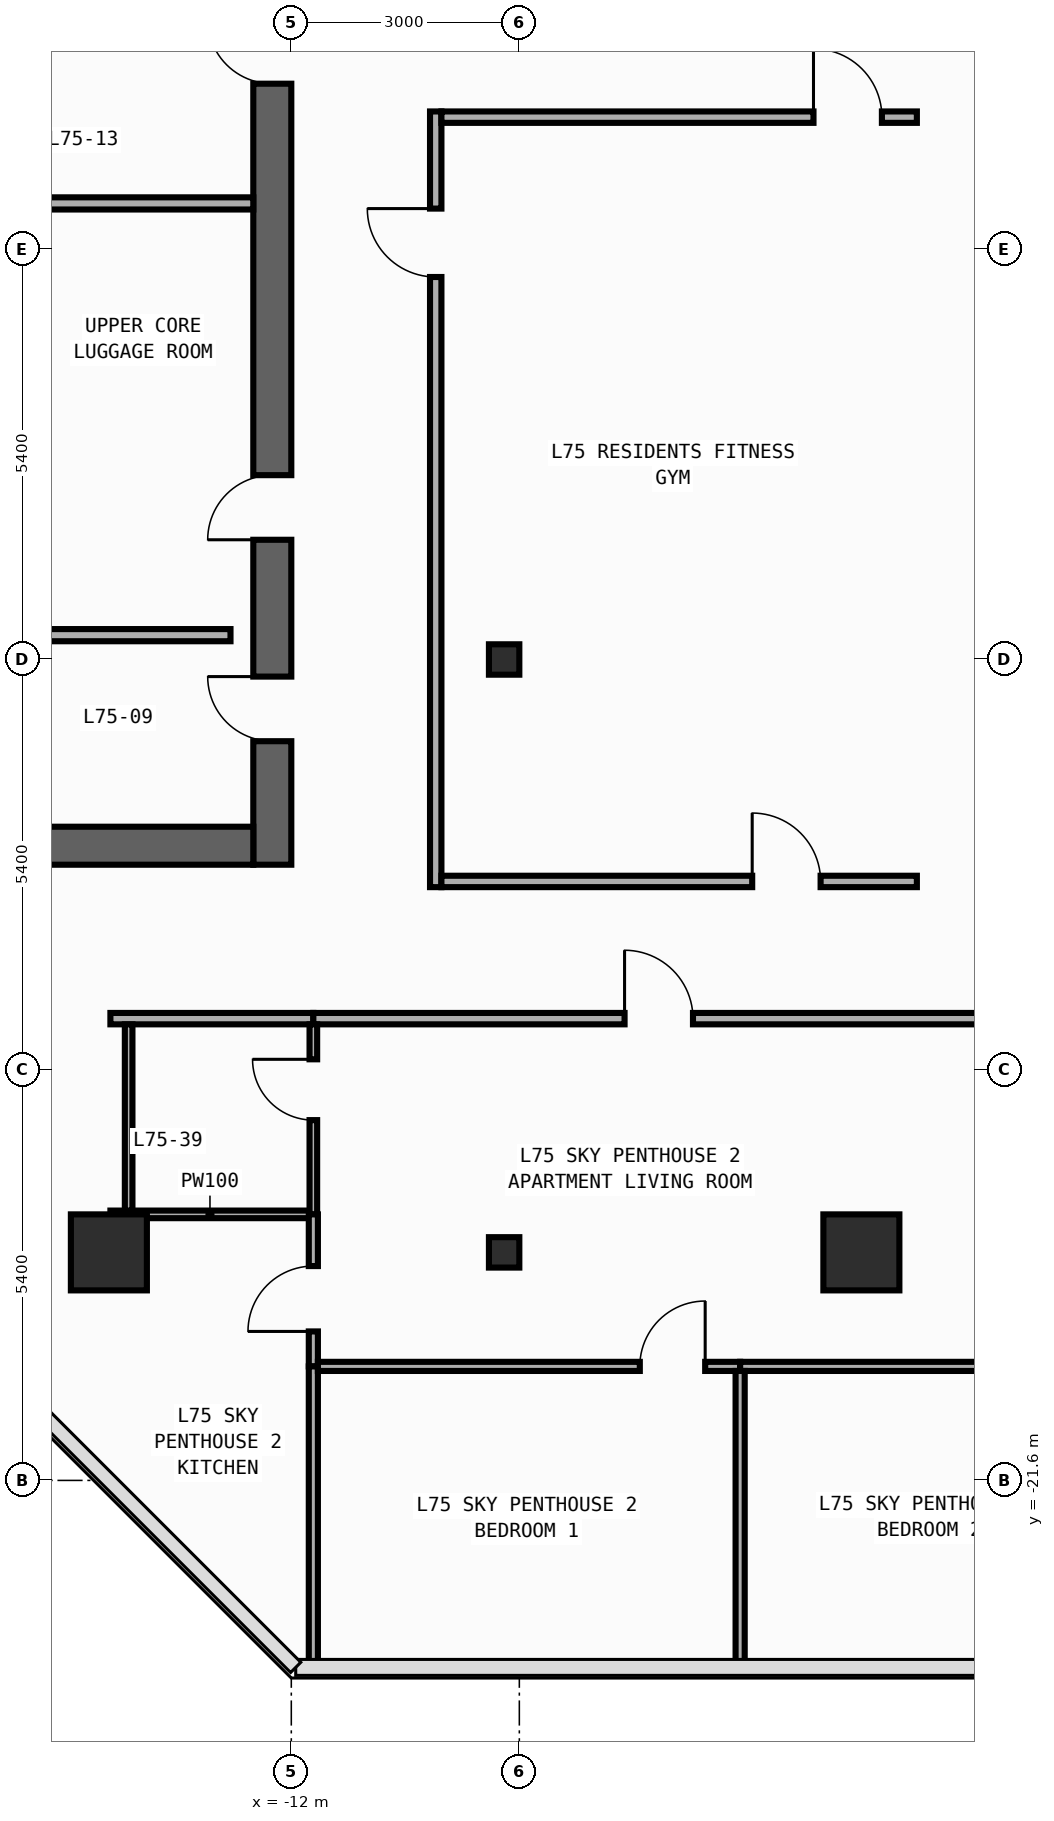
"""IFC4 building model, lengths in metres.
Left out: names, types, materials, properties, quantities, classifications, styles, units other than length and angle.
Written with IfcOpenShell. Run it as: python <this file> out.ifc"""

import sys

from ifc_helpers import new_model, si_unit, direction, frame, frame_2d, origin, origin_2d, place, context, subcontext, project, spatial, rectangle, circle, i_section, extrude, element, fill, save


model = new_model("IFC4")
c1 = context("Model", 3, precision=1e-05, world=origin(), true_north=direction((0.0, 1.0)))
c2 = subcontext(c1, "Body", "Model", "MODEL_VIEW")
j1 = project(units=[si_unit("LENGTHUNIT", "METRE"), si_unit("PLANEANGLEUNIT", "RADIAN")], contexts=[c1])
p1 = place(None, origin())
s1 = spatial("IfcSite", under=j1, at=p1, CompositionType="ELEMENT")
p2 = place(p1, origin())
s2 = spatial("IfcBuilding", under=s1, at=p2, CompositionType="ELEMENT")
p3 = place(p2, frame((0.0, 0.0, 311.8)))
s3 = spatial("IfcBuildingStorey", under=s2, at=p3, CompositionType="ELEMENT", Elevation=311.8)
p4 = place(p3, frame((-12.25, -13.5, 0.0), z_axis=(0.0, 0.0, 1.0), x_axis=(0.0, 1.0, 0.0)))
e1 = element("IfcWall", 1, at=p4, inside=s3, PredefinedType="SHEAR", context=c2, shape_type="SweptSolid", body=[
    extrude(rectangle(XDim=27.0, YDim=0.5, at=frame_2d((13.5, 0.0))), origin(), (0.0, 0.0, 1.0), 3.54),
])
p5 = place(p4, frame((15.175, 0.0, 0.0)))
e2 = element("IfcOpeningElement", 2, at=p5, cuts=e1, PredefinedType="OPENING", context=c2, shape_type="SweptSolid", body=[
    extrude(rectangle(XDim=0.85, YDim=2.1, at=frame_2d((0.425, 1.05))), frame((0.0, 0.26, 0.0), z_axis=(0.0, -1.0, 0.0), x_axis=(1.0, 0.0, 0.0)), (0.0, 0.0, 1.0), 0.52),
])
p6 = place(p4, frame((21.275, 0.0, 0.0)))
e3 = element("IfcOpeningElement", 3, at=p6, cuts=e1, PredefinedType="OPENING", context=c2, shape_type="SweptSolid", body=[
    extrude(rectangle(XDim=0.85, YDim=2.1, at=frame_2d((0.425, 1.05))), frame((0.0, 0.26, 0.0), z_axis=(0.0, -1.0, 0.0), x_axis=(1.0, 0.0, 0.0)), (0.0, 0.0, 1.0), 0.52),
])
p7 = place(p4, frame((4.275, 0.0, 0.0)))
e4 = element("IfcOpeningElement", 4, at=p7, cuts=e1, PredefinedType="OPENING", context=c2, shape_type="SweptSolid", body=[
    extrude(rectangle(XDim=0.85, YDim=2.1, at=frame_2d((0.425, 1.05))), frame((0.0, 0.26, 0.0), z_axis=(0.0, -1.0, 0.0), x_axis=(1.0, 0.0, 0.0)), (0.0, 0.0, 1.0), 0.52),
])
p8 = place(p4, frame((10.275, 0.0, 0.0)))
e5 = element("IfcOpeningElement", 5, at=p8, cuts=e1, PredefinedType="OPENING", context=c2, shape_type="SweptSolid", body=[
    extrude(rectangle(XDim=0.85, YDim=2.1, at=frame_2d((0.425, 1.05))), frame((0.0, 0.26, 0.0), z_axis=(0.0, -1.0, 0.0), x_axis=(1.0, 0.0, 0.0)), (0.0, 0.0, 1.0), 0.52),
])
p9 = place(p4, frame((12.725, 0.0, 0.0)))
e6 = element("IfcOpeningElement", 6, at=p9, cuts=e1, PredefinedType="OPENING", context=c2, shape_type="SweptSolid", body=[
    extrude(rectangle(XDim=1.15, YDim=2.2, at=frame_2d((0.575, 1.1))), frame((0.0, 0.26, 0.0), z_axis=(0.0, -1.0, 0.0), x_axis=(1.0, 0.0, 0.0)), (0.0, 0.0, 1.0), 0.52),
])
p10 = place(p4, frame((1.625, 0.0, 0.0)))
e7 = element("IfcOpeningElement", 7, at=p10, cuts=e1, PredefinedType="OPENING", context=c2, shape_type="SweptSolid", body=[
    extrude(rectangle(XDim=0.85, YDim=2.1, at=frame_2d((0.425, 1.05))), frame((0.0, 0.26, 0.0), z_axis=(0.0, -1.0, 0.0), x_axis=(1.0, 0.0, 0.0)), (0.0, 0.0, 1.0), 0.52),
])
p11 = place(p3, frame((-19.9, -13.25, 0.0), z_axis=(0.0, 0.0, 1.0), x_axis=(1.0, 0.0, 0.0)))
e8 = element("IfcWall", 8, at=p11, inside=s3, PredefinedType="SHEAR", context=c2, shape_type="SweptSolid", body=[
    extrude(rectangle(XDim=7.4, YDim=0.5, at=frame_2d((3.7, 0.0))), origin(), (0.0, 0.0, 1.0), 3.54),
])
for number, where, z_axis, x_axis in (
    (9, (-9.2, -18.6, 0.0), (0.0, 0.0, 1.0), (1.0, 0.0, 0.0)),
    (10, (-9.2, -10.8, 0.0), (0.0, 0.0, 1.0), (1.0, 0.0, 0.0)),
):
    element("IfcColumn", number, at=place(p3, frame(where, z_axis=z_axis, x_axis=x_axis)), inside=s3, PredefinedType="COLUMN", context=c2, shape_type="SweptSolid", body=[
        extrude(i_section(OverallWidth=0.4, OverallDepth=0.4, WebThickness=0.013, FlangeThickness=0.021, FilletRadius=0.022, at=origin_2d()), origin(), (0.0, 0.0, 1.0), 3.8),
    ])
for number, where, z_axis, x_axis in (
    (11, (-14.4, -18.6, 0.0), (0.0, 0.0, 1.0), (1.0, 0.0, 0.0)),
    (12, (-4.5, -18.6, 0.0), (0.0, 0.0, 1.0), (1.0, 0.0, 0.0)),
):
    element("IfcColumn", number, at=place(p3, frame(where, z_axis=z_axis, x_axis=x_axis)), inside=s3, PredefinedType="COLUMN", context=c2, shape_type="SweptSolid", body=[
        extrude(circle(Radius=0.5, at=origin_2d()), origin(), (0.0, 0.0, 1.0), 3.8),
    ])
p12 = place(p3, frame((-15.4, -10.48, 0.0), z_axis=(0.0, 0.0, 1.0), x_axis=(1.0, 0.0, 0.0)))
e13 = element("IfcWall", 13, at=p12, inside=s3, PredefinedType="STANDARD", context=c2, shape_type="SweptSolid", body=[
    extrude(rectangle(XDim=2.6, YDim=0.16, at=frame_2d((1.3, 0.0))), origin(), (0.0, 0.0, 1.0), 3.54),
])
p13 = place(p3, frame((-15.4, -4.8, 0.0), z_axis=(0.0, 0.0, 1.0), x_axis=(1.0, 0.0, 0.0)))
e14 = element("IfcWall", 14, at=p13, inside=s3, PredefinedType="PARTITIONING", context=c2, shape_type="SweptSolid", body=[
    extrude(rectangle(XDim=2.9, YDim=0.16, at=frame_2d((1.45, 0.0))), origin(), (0.0, 0.0, 1.0), 3.54),
])
p14 = place(p3, frame((-10.1, -13.795, 0.0), z_axis=(0.0, 0.0, 1.0), x_axis=(0.0, 1.0, 0.0)))
e15 = element("IfcWall", 15, at=p14, inside=s3, PredefinedType="PARTITIONING", context=c2, shape_type="SweptSolid", body=[
    extrude(rectangle(XDim=10.205, YDim=0.15, at=frame_2d((5.103, 0.0))), origin(), (0.0, 0.0, 1.0), 3.54),
])
p15 = place(p14, frame((8.027, 0.0, 0.0)))
e16 = element("IfcOpeningElement", 16, at=p15, cuts=e15, PredefinedType="OPENING", context=c2, shape_type="SweptSolid", body=[
    extrude(rectangle(XDim=0.9, YDim=2.15, at=frame_2d((0.45, 1.075))), frame((0.0, 0.085, 0.0), z_axis=(0.0, -1.0, 0.0), x_axis=(1.0, 0.0, 0.0)), (0.0, 0.0, 1.0), 0.17),
])
p16 = place(p3, frame((-10.025, -3.665, 0.0), z_axis=(0.0, 0.0, 1.0), x_axis=(1.0, 0.0, 0.0)))
e17 = element("IfcWall", 17, at=p16, inside=s3, PredefinedType="PARTITIONING", context=c2, shape_type="SweptSolid", body=[
    extrude(rectangle(XDim=6.255, YDim=0.15, at=frame_2d((3.127, 0.0))), origin(), (0.0, 0.0, 1.0), 3.54),
])
p17 = place(p16, frame((4.895, 0.0, 0.0)))
e18 = element("IfcOpeningElement", 18, at=p17, cuts=e17, PredefinedType="OPENING", context=c2, shape_type="SweptSolid", body=[
    extrude(rectangle(XDim=0.9, YDim=2.15, at=frame_2d((0.45, 1.075))), frame((0.0, 0.085, 0.0), z_axis=(0.0, -1.0, 0.0), x_axis=(1.0, 0.0, 0.0)), (0.0, 0.0, 1.0), 0.17),
])
p18 = place(p3, frame((-14.38, -15.525, 0.0), z_axis=(0.0, 0.0, 1.0), x_axis=(1.0, 0.0, 0.0)))
e19 = element("IfcWall", 19, at=p18, inside=s3, PredefinedType="PARTITIONING", context=c2, shape_type="SweptSolid", body=[
    extrude(rectangle(XDim=2.67, YDim=0.15, at=frame_2d((1.335, 0.0))), origin(), (0.0, 0.0, 1.0), 3.54),
])
p19 = place(p3, frame((-11.71, -15.525, 0.0), z_axis=(0.0, 0.0, 1.0), x_axis=(1.0, 0.0, 0.0)))
e20 = element("IfcWall", 20, at=p19, inside=s3, PredefinedType="PARTITIONING", context=c2, shape_type="SweptSolid", body=[
    extrude(rectangle(XDim=11.31, YDim=0.15, at=frame_2d((5.655, 0.0))), origin(), (0.0, 0.0, 1.0), 3.54),
])
p20 = place(p19, frame((4.094, 0.0, 0.0)))
e21 = element("IfcOpeningElement", 21, at=p20, cuts=e20, PredefinedType="OPENING", context=c2, shape_type="SweptSolid", body=[
    extrude(rectangle(XDim=0.9, YDim=2.15, at=frame_2d((0.45, 1.075))), frame((0.0, 0.085, 0.0), z_axis=(0.0, -1.0, 0.0), x_axis=(1.0, 0.0, 0.0)), (0.0, 0.0, 1.0), 0.17),
])
p21 = place(p3, frame((-10.025, -13.72, 0.0), z_axis=(0.0, 0.0, 1.0), x_axis=(1.0, 0.0, 0.0)))
e22 = element("IfcWall", 22, at=p21, inside=s3, PredefinedType="PARTITIONING", context=c2, shape_type="SweptSolid", body=[
    extrude(rectangle(XDim=6.255, YDim=0.15, at=frame_2d((3.127, 0.0))), origin(), (0.0, 0.0, 1.0), 3.54),
])
p22 = place(p21, frame((4.089, 0.0, 0.0)))
e23 = element("IfcOpeningElement", 23, at=p22, cuts=e22, PredefinedType="OPENING", context=c2, shape_type="SweptSolid", body=[
    extrude(rectangle(XDim=0.9, YDim=2.15, at=frame_2d((0.45, 1.075))), frame((0.0, 0.085, 0.0), z_axis=(0.0, -1.0, 0.0), x_axis=(1.0, 0.0, 0.0)), (0.0, 0.0, 1.0), 0.17),
])
p23 = place(p3, frame((-14.38, -18.1, 0.0), z_axis=(0.0, 0.0, 1.0), x_axis=(1.0, 0.0, 0.0)))
e24 = element("IfcWall", 24, at=p23, inside=s3, PredefinedType="PARTITIONING", context=c2, shape_type="SweptSolid", body=[
    extrude(rectangle(XDim=2.62, YDim=0.1, at=frame_2d((1.31, 0.0))), origin(), (0.0, 0.0, 1.0), 3.54),
])
p24 = place(p3, frame((-11.71, -18.1, 0.0), z_axis=(0.0, 0.0, 1.0), x_axis=(0.0, 1.0, 0.0)))
e25 = element("IfcWall", 25, at=p24, inside=s3, PredefinedType="PARTITIONING", context=c2, shape_type="SweptSolid", body=[
    extrude(rectangle(XDim=2.5, YDim=0.1, at=frame_2d((1.25, 0.0))), origin(), (0.0, 0.0, 1.0), 3.54),
])
p25 = place(p24, frame((1.24, 0.0, 0.0)))
e26 = element("IfcOpeningElement", 26, at=p25, cuts=e25, PredefinedType="OPENING", context=c2, shape_type="SweptSolid", body=[
    extrude(rectangle(XDim=0.8, YDim=2.1, at=frame_2d((0.4, 1.05))), frame((0.0, 0.06, 0.0), z_axis=(0.0, -1.0, 0.0), x_axis=(1.0, 0.0, 0.0)), (0.0, 0.0, 1.0), 0.12),
])
p26 = place(p3, frame((-11.71, -20.1, 0.0), z_axis=(0.0, 0.0, 1.0), x_axis=(0.0, 1.0, 0.0)))
e27 = element("IfcWall", 27, at=p26, inside=s3, PredefinedType="PARTITIONING", context=c2, shape_type="SweptSolid", body=[
    extrude(rectangle(XDim=2.0, YDim=0.12, at=frame_2d((1.0, 0.0))), origin(), (0.0, 0.0, 1.0), 3.54),
])
p27 = place(p26, frame((0.46, 0.0, 0.0)))
e28 = element("IfcOpeningElement", 28, at=p27, cuts=e27, PredefinedType="OPENING", context=c2, shape_type="SweptSolid", body=[
    extrude(rectangle(XDim=0.86, YDim=2.15, at=frame_2d((0.43, 1.075))), frame((0.0, 0.07, 0.0), z_axis=(0.0, -1.0, 0.0), x_axis=(1.0, 0.0, 0.0)), (0.0, 0.0, 1.0), 0.14),
])
p28 = place(p3, frame((-11.71, -24.055, 0.0), z_axis=(0.0, 0.0, 1.0), x_axis=(0.0, 1.0, 0.0)))
e29 = element("IfcWall", 29, at=p28, inside=s3, PredefinedType="PARTITIONING", context=c2, shape_type="SweptSolid", body=[
    extrude(rectangle(XDim=3.955, YDim=0.12, at=frame_2d((1.978, 0.0))), origin(), (0.0, 0.0, 1.0), 3.54),
])
p29 = place(p3, frame((-11.65, -20.1, 0.0), z_axis=(0.0, 0.0, 1.0), x_axis=(1.0, 0.0, 0.0)))
e30 = element("IfcWall", 30, at=p29, inside=s3, PredefinedType="PARTITIONING", context=c2, shape_type="SweptSolid", body=[
    extrude(rectangle(XDim=5.555, YDim=0.12, at=frame_2d((2.777, 0.0))), origin(), (0.0, 0.0, 1.0), 3.54),
])
p30 = place(p29, frame((4.235, 0.0, 0.0)))
e31 = element("IfcOpeningElement", 31, at=p30, cuts=e30, PredefinedType="OPENING", context=c2, shape_type="SweptSolid", body=[
    extrude(rectangle(XDim=0.86, YDim=2.15, at=frame_2d((0.43, 1.075))), frame((0.0, 0.07, 0.0), z_axis=(0.0, -1.0, 0.0), x_axis=(1.0, 0.0, 0.0)), (0.0, 0.0, 1.0), 0.14),
])
p31 = place(p3, frame((-6.095, -20.1, 0.0), z_axis=(0.0, 0.0, 1.0), x_axis=(1.0, 0.0, 0.0)))
e32 = element("IfcWall", 32, at=p31, inside=s3, PredefinedType="PARTITIONING", context=c2, shape_type="SweptSolid", body=[
    extrude(rectangle(XDim=5.625, YDim=0.12, at=frame_2d((2.812, 0.0))), origin(), (0.0, 0.0, 1.0), 3.54),
])
p32 = place(p31, frame((3.496, 0.0, 0.0)))
e33 = element("IfcOpeningElement", 33, at=p32, cuts=e32, PredefinedType="OPENING", context=c2, shape_type="SweptSolid", body=[
    extrude(rectangle(XDim=0.86, YDim=2.15, at=frame_2d((0.43, 1.075))), frame((0.0, 0.07, 0.0), z_axis=(0.0, -1.0, 0.0), x_axis=(1.0, 0.0, 0.0)), (0.0, 0.0, 1.0), 0.14),
])
p33 = place(p3, frame((-6.095, -24.055, 0.0), z_axis=(0.0, 0.0, 1.0), x_axis=(0.0, 1.0, 0.0)))
e34 = element("IfcWall", 34, at=p33, inside=s3, PredefinedType="PARTITIONING", context=c2, shape_type="SweptSolid", body=[
    extrude(rectangle(XDim=3.895, YDim=0.12, at=frame_2d((1.948, 0.0))), origin(), (0.0, 0.0, 1.0), 3.54),
])
p34 = place(p3, frame((-14.14, -18.05, 0.0), z_axis=(0.0, 0.0, 1.0), x_axis=(0.0, 1.0, 0.0)))
e35 = element("IfcWall", 35, at=p34, inside=s3, PredefinedType="PARTITIONING", context=c2, shape_type="SweptSolid", body=[
    extrude(rectangle(XDim=2.45, YDim=0.1, at=frame_2d((1.225, 0.0))), origin(), (0.0, 0.0, 1.0), 2.64),
])
p35 = place(p7, origin())
e36 = element("IfcDoor", 36, at=p35, inside=s3, OperationType="SINGLE_SWING_LEFT", PredefinedType="DOOR", context=c2, shape_type="SweptSolid", body=[
    extrude(rectangle(XDim=0.85, YDim=2.1, at=frame_2d((0.425, 1.05))), frame((0.0, 0.025, 0.0), z_axis=(0.0, -1.0, 0.0), x_axis=(1.0, 0.0, 0.0)), (0.0, 0.0, 1.0), 0.05),
])
fill(e4, e36)
p36 = place(p8, origin())
e37 = element("IfcDoor", 37, at=p36, inside=s3, OperationType="SINGLE_SWING_RIGHT", PredefinedType="DOOR", context=c2, shape_type="SweptSolid", body=[
    extrude(rectangle(XDim=0.85, YDim=2.1, at=frame_2d((0.425, 1.05))), frame((0.0, 0.025, 0.0), z_axis=(0.0, -1.0, 0.0), x_axis=(1.0, 0.0, 0.0)), (0.0, 0.0, 1.0), 0.05),
])
fill(e5, e37)
p37 = place(p10, origin())
e38 = element("IfcDoor", 38, at=p37, inside=s3, OperationType="SINGLE_SWING_RIGHT", PredefinedType="DOOR", context=c2, shape_type="SweptSolid", body=[
    extrude(rectangle(XDim=0.85, YDim=2.1, at=frame_2d((0.425, 1.05))), frame((0.0, 0.025, 0.0), z_axis=(0.0, -1.0, 0.0), x_axis=(1.0, 0.0, 0.0)), (0.0, 0.0, 1.0), 0.05),
])
fill(e7, e38)
p38 = place(p15, origin())
e39 = element("IfcDoor", 39, at=p38, inside=s3, OperationType="SINGLE_SWING_RIGHT", PredefinedType="DOOR", context=c2, shape_type="SweptSolid", body=[
    extrude(rectangle(XDim=0.9, YDim=2.15, at=frame_2d((0.45, 1.075))), frame((0.0, 0.025, 0.0), z_axis=(0.0, -1.0, 0.0), x_axis=(1.0, 0.0, 0.0)), (0.0, 0.0, 1.0), 0.05),
])
fill(e16, e39)
p39 = place(p17, origin())
e40 = element("IfcDoor", 40, at=p39, inside=s3, OperationType="SINGLE_SWING_LEFT", PredefinedType="DOOR", context=c2, shape_type="SweptSolid", body=[
    extrude(rectangle(XDim=0.9, YDim=2.15, at=frame_2d((0.45, 1.075))), frame((0.0, 0.025, 0.0), z_axis=(0.0, -1.0, 0.0), x_axis=(1.0, 0.0, 0.0)), (0.0, 0.0, 1.0), 0.05),
])
fill(e18, e40)
p40 = place(p20, origin())
e41 = element("IfcDoor", 41, at=p40, inside=s3, OperationType="SINGLE_SWING_LEFT", PredefinedType="DOOR", context=c2, shape_type="SweptSolid", body=[
    extrude(rectangle(XDim=0.9, YDim=2.15, at=frame_2d((0.45, 1.075))), frame((0.0, 0.025, 0.0), z_axis=(0.0, -1.0, 0.0), x_axis=(1.0, 0.0, 0.0)), (0.0, 0.0, 1.0), 0.05),
])
fill(e21, e41)
p41 = place(p22, origin())
e42 = element("IfcDoor", 42, at=p41, inside=s3, OperationType="SINGLE_SWING_LEFT", PredefinedType="DOOR", context=c2, shape_type="SweptSolid", body=[
    extrude(rectangle(XDim=0.9, YDim=2.15, at=frame_2d((0.45, 1.075))), frame((0.0, 0.025, 0.0), z_axis=(0.0, -1.0, 0.0), x_axis=(1.0, 0.0, 0.0)), (0.0, 0.0, 1.0), 0.05),
])
fill(e23, e42)
p42 = place(p25, origin())
e43 = element("IfcDoor", 43, at=p42, inside=s3, OperationType="SINGLE_SWING_RIGHT", PredefinedType="DOOR", context=c2, shape_type="SweptSolid", body=[
    extrude(rectangle(XDim=0.8, YDim=2.1, at=frame_2d((0.4, 1.05))), frame((0.0, 0.025, 0.0), z_axis=(0.0, -1.0, 0.0), x_axis=(1.0, 0.0, 0.0)), (0.0, 0.0, 1.0), 0.05),
])
fill(e26, e43)
p43 = place(p27, origin())
e44 = element("IfcDoor", 44, at=p43, inside=s3, OperationType="SINGLE_SWING_LEFT", PredefinedType="DOOR", context=c2, shape_type="SweptSolid", body=[
    extrude(rectangle(XDim=0.86, YDim=2.15, at=frame_2d((0.43, 1.075))), frame((0.0, 0.025, 0.0), z_axis=(0.0, -1.0, 0.0), x_axis=(1.0, 0.0, 0.0)), (0.0, 0.0, 1.0), 0.05),
])
fill(e28, e44)
p44 = place(p30, origin())
e45 = element("IfcDoor", 45, at=p44, inside=s3, OperationType="SINGLE_SWING_RIGHT", PredefinedType="DOOR", context=c2, shape_type="SweptSolid", body=[
    extrude(rectangle(XDim=0.86, YDim=2.15, at=frame_2d((0.43, 1.075))), frame((0.0, 0.025, 0.0), z_axis=(0.0, -1.0, 0.0), x_axis=(1.0, 0.0, 0.0)), (0.0, 0.0, 1.0), 0.05),
])
fill(e31, e45)
save(model, sys.argv[1])
